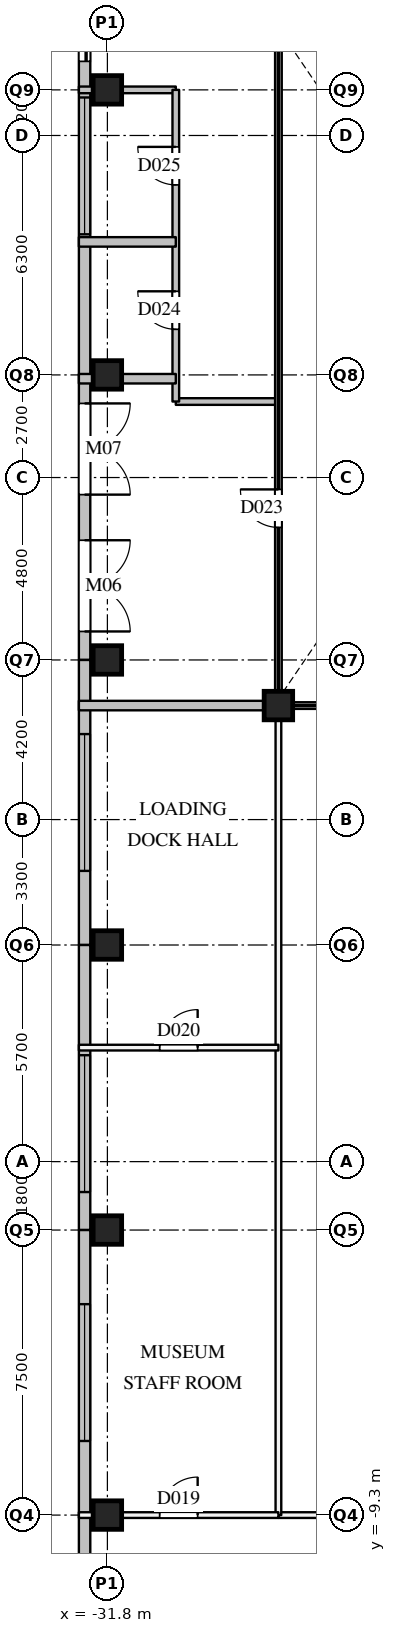
"""IFC4 building model, lengths in metres.
Left out: names, types, materials, properties, quantities, classifications, styles, units other than length and angle.
Written with IfcOpenShell. Run it as: python <this file> out.ifc"""

import sys

from ifc_helpers import new_model, si_unit, direction, frame, frame_2d, origin, origin_2d, place, context, subcontext, project, spatial, rectangle, extrude, element, fill, save


model = new_model("IFC4")
c1 = context("Model", 3, precision=1e-05, world=origin(), true_north=direction((0.0, 1.0)))
c2 = subcontext(c1, "Body", "Model", "MODEL_VIEW")
j1 = project(units=[si_unit("LENGTHUNIT", "METRE"), si_unit("PLANEANGLEUNIT", "RADIAN")], contexts=[c1])
p1 = place(None, origin())
s1 = spatial("IfcSite", under=j1, at=p1, CompositionType="ELEMENT")
p2 = place(p1, origin())
s2 = spatial("IfcBuilding", under=s1, at=p2, CompositionType="ELEMENT")
p3 = place(p2, origin())
s3 = spatial("IfcBuildingStorey", under=s2, at=p3, CompositionType="ELEMENT", Elevation=0.0)
for number, where, z_axis, x_axis in (
    (1, (-31.8, -9.3, 0.0), (0.0, 0.0, 1.0), (1.0, 0.0, 0.0)),
    (2, (-31.8, -1.8, 0.0), (0.0, 0.0, 1.0), (1.0, 0.0, 0.0)),
    (3, (-31.8, 5.7, 0.0), (0.0, 0.0, 1.0), (1.0, 0.0, 0.0)),
    (4, (-31.8, 13.2, 0.0), (0.0, 0.0, 1.0), (1.0, 0.0, 0.0)),
    (5, (-31.8, 20.7, 0.0), (0.0, 0.0, 1.0), (1.0, 0.0, 0.0)),
    (6, (-31.8, 28.2, 0.0), (0.0, 0.0, 1.0), (1.0, 0.0, 0.0)),
    (7, (-27.3, 12.0, 0.0), (0.0, 0.0, 1.0), (1.0, 0.0, 0.0)),
):
    element("IfcColumn", number, at=place(p3, frame(where, z_axis=z_axis, x_axis=x_axis)), inside=s3, PredefinedType="COLUMN", context=c2, shape_type="SweptSolid", body=[
        extrude(rectangle(XDim=0.75, YDim=0.75, at=origin_2d()), origin(), (0.0, 0.0, 1.0), 8.0),
    ])
p4 = place(p3, frame((-32.4, 35.7, 0.0), z_axis=(0.0, 0.0, 1.0), x_axis=(0.0, -1.0, 0.0)))
e8 = element("IfcWall", 8, at=p4, inside=s3, PredefinedType="SOLIDWALL", context=c2, shape_type="SweptSolid", body=[
    extrude(rectangle(XDim=7.5, YDim=0.3, at=frame_2d((3.75, 0.0))), origin(), (0.0, 0.0, 1.0), 7.59),
])
p5 = place(p4, frame((4.35, 0.0, 0.0)))
e9 = element("IfcOpeningElement", 9, at=p5, cuts=e8, PredefinedType="OPENING", context=c2, shape_type="SweptSolid", body=[
    extrude(rectangle(XDim=2.4, YDim=2.4, at=frame_2d((1.2, 1.2))), frame((0.0, 0.16, 0.0), z_axis=(0.0, -1.0, 0.0), x_axis=(1.0, 0.0, 0.0)), (0.0, 0.0, 1.0), 0.32),
])
p6 = place(p4, frame((0.75, 0.0, 0.0)))
e10 = element("IfcOpeningElement", 10, at=p6, cuts=e8, PredefinedType="OPENING", context=c2, shape_type="SweptSolid", body=[
    extrude(rectangle(XDim=2.4, YDim=2.4, at=frame_2d((1.2, 1.2))), frame((0.0, 0.16, 0.0), z_axis=(0.0, -1.0, 0.0), x_axis=(1.0, 0.0, 0.0)), (0.0, 0.0, 1.0), 0.32),
])
p7 = place(p3, frame((-32.4, 28.2, 0.0), z_axis=(0.0, 0.0, 1.0), x_axis=(0.0, -1.0, 0.0)))
e11 = element("IfcWall", 11, at=p7, inside=s3, PredefinedType="SOLIDWALL", context=c2, shape_type="SweptSolid", body=[
    extrude(rectangle(XDim=7.5, YDim=0.3, at=frame_2d((3.75, 0.0))), origin(), (0.0, 0.0, 1.0), 7.59),
])
p8 = place(p7, frame((0.2, 0.0, 0.9)))
e12 = element("IfcOpeningElement", 12, at=p8, cuts=e11, PredefinedType="OPENING", context=c2, shape_type="SweptSolid", body=[
    extrude(rectangle(XDim=3.6, YDim=3.0, at=frame_2d((1.8, 1.5))), frame((0.0, 0.16, 0.0), z_axis=(0.0, -1.0, 0.0), x_axis=(1.0, 0.0, 0.0)), (0.0, 0.0, 1.0), 0.32),
])
p9 = place(p3, frame((-32.4, 20.7, 0.0), z_axis=(0.0, 0.0, 1.0), x_axis=(0.0, -1.0, 0.0)))
e13 = element("IfcWall", 13, at=p9, inside=s3, PredefinedType="SOLIDWALL", context=c2, shape_type="SweptSolid", body=[
    extrude(rectangle(XDim=7.5, YDim=0.3, at=frame_2d((3.75, 0.0))), origin(), (0.0, 0.0, 1.0), 7.59),
])
p10 = place(p9, frame((4.35, 0.0, 0.0)))
e14 = element("IfcOpeningElement", 14, at=p10, cuts=e13, PredefinedType="OPENING", context=c2, shape_type="SweptSolid", body=[
    extrude(rectangle(XDim=2.4, YDim=2.7, at=frame_2d((1.2, 1.35))), frame((0.0, 0.16, 0.0), z_axis=(0.0, -1.0, 0.0), x_axis=(1.0, 0.0, 0.0)), (0.0, 0.0, 1.0), 0.32),
])
p11 = place(p9, frame((0.75, 0.0, 0.0)))
e15 = element("IfcOpeningElement", 15, at=p11, cuts=e13, PredefinedType="OPENING", context=c2, shape_type="SweptSolid", body=[
    extrude(rectangle(XDim=2.4, YDim=2.7, at=frame_2d((1.2, 1.35))), frame((0.0, 0.16, 0.0), z_axis=(0.0, -1.0, 0.0), x_axis=(1.0, 0.0, 0.0)), (0.0, 0.0, 1.0), 0.32),
])
p12 = place(p3, frame((-32.4, 13.2, 0.0), z_axis=(0.0, 0.0, 1.0), x_axis=(0.0, -1.0, 0.0)))
e16 = element("IfcWall", 16, at=p12, inside=s3, PredefinedType="SOLIDWALL", context=c2, shape_type="SweptSolid", body=[
    extrude(rectangle(XDim=7.5, YDim=0.3, at=frame_2d((3.75, 0.0))), origin(), (0.0, 0.0, 1.0), 7.59),
])
p13 = place(p12, frame((1.95, 0.0, 0.9)))
e17 = element("IfcOpeningElement", 17, at=p13, cuts=e16, PredefinedType="OPENING", context=c2, shape_type="SweptSolid", body=[
    extrude(rectangle(XDim=3.6, YDim=3.0, at=frame_2d((1.8, 1.5))), frame((0.0, 0.16, 0.0), z_axis=(0.0, -1.0, 0.0), x_axis=(1.0, 0.0, 0.0)), (0.0, 0.0, 1.0), 0.32),
])
p14 = place(p3, frame((-32.4, 5.7, 0.0), z_axis=(0.0, 0.0, 1.0), x_axis=(0.0, -1.0, 0.0)))
e18 = element("IfcWall", 18, at=p14, inside=s3, PredefinedType="SOLIDWALL", context=c2, shape_type="SweptSolid", body=[
    extrude(rectangle(XDim=7.5, YDim=0.3, at=frame_2d((3.75, 0.0))), origin(), (0.0, 0.0, 1.0), 7.59),
])
p15 = place(p14, frame((2.9, 0.0, 0.9)))
e19 = element("IfcOpeningElement", 19, at=p15, cuts=e18, PredefinedType="OPENING", context=c2, shape_type="SweptSolid", body=[
    extrude(rectangle(XDim=3.6, YDim=3.0, at=frame_2d((1.8, 1.5))), frame((0.0, 0.16, 0.0), z_axis=(0.0, -1.0, 0.0), x_axis=(1.0, 0.0, 0.0)), (0.0, 0.0, 1.0), 0.32),
])
p16 = place(p3, frame((-32.4, -1.8, 0.0), z_axis=(0.0, 0.0, 1.0), x_axis=(0.0, -1.0, 0.0)))
e20 = element("IfcWall", 20, at=p16, inside=s3, PredefinedType="SOLIDWALL", context=c2, shape_type="SweptSolid", body=[
    extrude(rectangle(XDim=7.5, YDim=0.3, at=frame_2d((3.75, 0.0))), origin(), (0.0, 0.0, 1.0), 7.59),
])
p17 = place(p16, frame((1.95, 0.0, 0.9)))
e21 = element("IfcOpeningElement", 21, at=p17, cuts=e20, PredefinedType="OPENING", context=c2, shape_type="SweptSolid", body=[
    extrude(rectangle(XDim=3.6, YDim=3.0, at=frame_2d((1.8, 1.5))), frame((0.0, 0.16, 0.0), z_axis=(0.0, -1.0, 0.0), x_axis=(1.0, 0.0, 0.0)), (0.0, 0.0, 1.0), 0.32),
])
p18 = place(p3, frame((-32.4, -9.3, 0.0), z_axis=(0.0, 0.0, 1.0), x_axis=(0.0, -1.0, 0.0)))
e22 = element("IfcWall", 22, at=p18, inside=s3, PredefinedType="SOLIDWALL", context=c2, shape_type="SweptSolid", body=[
    extrude(rectangle(XDim=7.5, YDim=0.3, at=frame_2d((3.75, 0.0))), origin(), (0.0, 0.0, 1.0), 7.59),
])
p19 = place(p18, frame((1.95, 0.0, 0.9)))
e23 = element("IfcOpeningElement", 23, at=p19, cuts=e22, PredefinedType="OPENING", context=c2, shape_type="SweptSolid", body=[
    extrude(rectangle(XDim=3.6, YDim=3.0, at=frame_2d((1.8, 1.5))), frame((0.0, 0.16, 0.0), z_axis=(0.0, -1.0, 0.0), x_axis=(1.0, 0.0, 0.0)), (0.0, 0.0, 1.0), 0.32),
])
p20 = place(p3, frame((-27.3, 12.0, 0.0), z_axis=(0.0, 0.0, 1.0), x_axis=(1.0, 0.0, 0.0)))
e24 = element("IfcWall", 24, at=p20, inside=s3, PredefinedType="PARTITIONING", context=c2, shape_type="SweptSolid", body=[
    extrude(rectangle(XDim=12.0, YDim=0.175, at=frame_2d((6.0, 0.0))), origin(), (0.0, 0.0, 1.0), 7.59),
])
p21 = place(p20, frame((5.0, 0.0, 0.0)))
e25 = element("IfcOpeningElement", 25, at=p21, cuts=e24, PredefinedType="OPENING", context=c2, shape_type="SweptSolid", body=[
    extrude(rectangle(XDim=1.0, YDim=2.1, at=frame_2d((0.5, 1.05))), frame((0.0, 0.097, 0.0), z_axis=(0.0, -1.0, 0.0), x_axis=(1.0, 0.0, 0.0)), (0.0, 0.0, 1.0), 0.195),
])
p22 = place(p3, frame((-30.0, 20.0, 0.0), z_axis=(0.0, 0.0, 1.0), x_axis=(1.0, 0.0, 0.0)))
e26 = element("IfcWall", 26, at=p22, inside=s3, PredefinedType="PARTITIONING", context=c2, shape_type="SweptSolid", body=[
    extrude(rectangle(XDim=2.7, YDim=0.175, at=frame_2d((1.35, 0.0))), origin(), (0.0, 0.0, 1.0), 7.59),
])
p23 = place(p3, frame((-32.55, 28.2, 0.0), z_axis=(0.0, 0.0, 1.0), x_axis=(1.0, 0.0, 0.0)))
e27 = element("IfcWall", 27, at=p23, inside=s3, PredefinedType="PARTITIONING", context=c2, shape_type="SweptSolid", body=[
    extrude(rectangle(XDim=2.55, YDim=0.175, at=frame_2d((1.275, 0.0))), origin(), (0.0, 0.0, 1.0), 7.59),
])
p24 = place(p3, frame((-30.0, 20.0, 0.0), z_axis=(0.0, 0.0, 1.0), x_axis=(0.0, 1.0, 0.0)))
e28 = element("IfcWall", 28, at=p24, inside=s3, PredefinedType="PARTITIONING", context=c2, shape_type="SweptSolid", body=[
    extrude(rectangle(XDim=8.2, YDim=0.175, at=frame_2d((4.1, 0.0))), origin(), (0.0, 0.0, 1.0), 7.59),
])
p25 = place(p24, frame((1.9, 0.0, 0.0)))
e29 = element("IfcOpeningElement", 29, at=p25, cuts=e28, PredefinedType="OPENING", context=c2, shape_type="SweptSolid", body=[
    extrude(rectangle(XDim=1.0, YDim=2.1, at=frame_2d((0.5, 1.05))), frame((0.0, 0.097, 0.0), z_axis=(0.0, -1.0, 0.0), x_axis=(1.0, 0.0, 0.0)), (0.0, 0.0, 1.0), 0.195),
])
p26 = place(p24, frame((5.7, 0.0, 0.0)))
e30 = element("IfcOpeningElement", 30, at=p26, cuts=e28, PredefinedType="OPENING", context=c2, shape_type="SweptSolid", body=[
    extrude(rectangle(XDim=1.0, YDim=2.1, at=frame_2d((0.5, 1.05))), frame((0.0, 0.097, 0.0), z_axis=(0.0, -1.0, 0.0), x_axis=(1.0, 0.0, 0.0)), (0.0, 0.0, 1.0), 0.195),
])
p27 = place(p3, frame((-27.3, 12.0, 0.0), z_axis=(0.0, 0.0, 1.0), x_axis=(0.0, 1.0, 0.0)))
e31 = element("IfcWall", 31, at=p27, inside=s3, PredefinedType="PARTITIONING", context=c2, shape_type="SweptSolid", body=[
    extrude(rectangle(XDim=35.35, YDim=0.175, at=frame_2d((17.675, 0.0))), origin(), (0.0, 0.0, 1.0), 6.79),
])
p28 = place(p27, frame((18.4, 0.0, 0.0)))
e32 = element("IfcOpeningElement", 32, at=p28, cuts=e31, PredefinedType="OPENING", context=c2, shape_type="SweptSolid", body=[
    extrude(rectangle(XDim=1.8, YDim=2.1, at=frame_2d((0.9, 1.05))), frame((0.0, 0.097, 0.0), z_axis=(0.0, -1.0, 0.0), x_axis=(1.0, 0.0, 0.0)), (0.0, 0.0, 1.0), 0.195),
])
p29 = place(p27, frame((23.7, 0.0, 0.0)))
e33 = element("IfcOpeningElement", 33, at=p29, cuts=e31, PredefinedType="OPENING", context=c2, shape_type="SweptSolid", body=[
    extrude(rectangle(XDim=1.8, YDim=2.1, at=frame_2d((0.9, 1.05))), frame((0.0, 0.097, 0.0), z_axis=(0.0, -1.0, 0.0), x_axis=(1.0, 0.0, 0.0)), (0.0, 0.0, 1.0), 0.195),
])
p30 = place(p27, frame((4.688, 0.0, 0.0)))
e34 = element("IfcOpeningElement", 34, at=p30, cuts=e31, PredefinedType="OPENING", context=c2, shape_type="SweptSolid", body=[
    extrude(rectangle(XDim=1.0, YDim=2.1, at=frame_2d((0.5, 1.05))), frame((0.0, 0.097, 0.0), z_axis=(0.0, -1.0, 0.0), x_axis=(1.0, 0.0, 0.0)), (0.0, 0.0, 1.0), 0.195),
])
p31 = place(p3, frame((-27.3, -9.3, 0.0), z_axis=(0.0, 0.0, 1.0), x_axis=(1.0, 0.0, 0.0)))
e35 = element("IfcWall", 35, at=p31, inside=s3, PredefinedType="PARTITIONING", context=c2, shape_type="SweptSolid", body=[
    extrude(rectangle(XDim=3.0, YDim=0.15, at=frame_2d((1.5, 0.0))), origin(), (0.0, 0.0, 1.0), 6.79),
])
p32 = place(p3, frame((-27.3, -9.3, 0.0), z_axis=(0.0, 0.0, 1.0), x_axis=(0.0, 1.0, 0.0)))
e36 = element("IfcWall", 36, at=p32, inside=s3, PredefinedType="PARTITIONING", context=c2, shape_type="SweptSolid", body=[
    extrude(rectangle(XDim=21.3, YDim=0.15, at=frame_2d((10.65, 0.0))), origin(), (0.0, 0.0, 1.0), 6.79),
])
p33 = place(p3, frame((-32.55, -9.3, 0.0), z_axis=(0.0, 0.0, 1.0), x_axis=(1.0, 0.0, 0.0)))
e37 = element("IfcWall", 37, at=p33, inside=s3, PredefinedType="PARTITIONING", context=c2, shape_type="SweptSolid", body=[
    extrude(rectangle(XDim=5.25, YDim=0.15, at=frame_2d((2.625, 0.0))), origin(), (0.0, 0.0, 1.0), 6.79),
])
p34 = place(p33, frame((2.125, 0.0, 0.0)))
e38 = element("IfcOpeningElement", 38, at=p34, cuts=e37, PredefinedType="OPENING", context=c2, shape_type="SweptSolid", body=[
    extrude(rectangle(XDim=1.0, YDim=2.1, at=frame_2d((0.5, 1.05))), frame((0.0, 0.085, 0.0), z_axis=(0.0, -1.0, 0.0), x_axis=(1.0, 0.0, 0.0)), (0.0, 0.0, 1.0), 0.17),
])
p35 = place(p3, frame((-32.55, 3.0, 0.0), z_axis=(0.0, 0.0, 1.0), x_axis=(1.0, 0.0, 0.0)))
e39 = element("IfcWall", 39, at=p35, inside=s3, PredefinedType="PARTITIONING", context=c2, shape_type="SweptSolid", body=[
    extrude(rectangle(XDim=5.25, YDim=0.15, at=frame_2d((2.625, 0.0))), origin(), (0.0, 0.0, 1.0), 6.79),
])
p36 = place(p35, frame((2.125, 0.0, 0.0)))
e40 = element("IfcOpeningElement", 40, at=p36, cuts=e39, PredefinedType="OPENING", context=c2, shape_type="SweptSolid", body=[
    extrude(rectangle(XDim=1.0, YDim=2.1, at=frame_2d((0.5, 1.05))), frame((0.0, 0.085, 0.0), z_axis=(0.0, -1.0, 0.0), x_axis=(1.0, 0.0, 0.0)), (0.0, 0.0, 1.0), 0.17),
])
p37 = place(p3, frame((-32.55, 12.0, 0.0), z_axis=(0.0, 0.0, 1.0), x_axis=(1.0, 0.0, 0.0)))
e41 = element("IfcWall", 41, at=p37, inside=s3, PredefinedType="PARTITIONING", context=c2, shape_type="SweptSolid", body=[
    extrude(rectangle(XDim=5.25, YDim=0.25, at=frame_2d((2.625, 0.0))), origin(), (0.0, 0.0, 1.0), 6.79),
])
p38 = place(p3, frame((-32.55, 20.6, 0.0), z_axis=(0.0, 0.0, 1.0), x_axis=(1.0, 0.0, 0.0)))
e42 = element("IfcWall", 42, at=p38, inside=s3, PredefinedType="PARTITIONING", context=c2, shape_type="SweptSolid", body=[
    extrude(rectangle(XDim=2.55, YDim=0.25, at=frame_2d((1.275, 0.0))), origin(), (0.0, 0.0, 1.0), 7.59),
])
p39 = place(p3, frame((-32.55, 24.2, 0.0), z_axis=(0.0, 0.0, 1.0), x_axis=(1.0, 0.0, 0.0)))
e43 = element("IfcWall", 43, at=p39, inside=s3, PredefinedType="PARTITIONING", context=c2, shape_type="SweptSolid", body=[
    extrude(rectangle(XDim=2.55, YDim=0.25, at=frame_2d((1.275, 0.0))), origin(), (0.0, 0.0, 1.0), 6.79),
])
p40 = place(p5, origin())
e44 = element("IfcDoor", 44, at=p40, inside=s3, OperationType="SLIDING_TO_LEFT", PredefinedType="DOOR", context=c2, shape_type="SweptSolid", body=[
    extrude(rectangle(XDim=2.4, YDim=2.4, at=frame_2d((1.2, 1.2))), frame((0.0, 0.025, 0.0), z_axis=(0.0, -1.0, 0.0), x_axis=(1.0, 0.0, 0.0)), (0.0, 0.0, 1.0), 0.05),
])
fill(e9, e44)
p41 = place(p8, origin())
e45 = element("IfcWindow", 45, at=p41, inside=s3, PartitioningType="SINGLE_PANEL", PredefinedType="WINDOW", context=c2, shape_type="SweptSolid", body=[
    extrude(rectangle(XDim=3.6, YDim=3.0, at=frame_2d((1.8, 1.5))), frame((0.0, 0.03, 0.0), z_axis=(0.0, -1.0, 0.0), x_axis=(1.0, 0.0, 0.0)), (0.0, 0.0, 1.0), 0.06),
])
fill(e12, e45)
p42 = place(p10, origin())
e46 = element("IfcDoor", 46, at=p42, inside=s3, OperationType="DOUBLE_DOOR_SINGLE_SWING", PredefinedType="DOOR", context=c2, shape_type="SweptSolid", body=[
    extrude(rectangle(XDim=2.4, YDim=2.7, at=frame_2d((1.2, 1.35))), frame((0.0, 0.025, 0.0), z_axis=(0.0, -1.0, 0.0), x_axis=(1.0, 0.0, 0.0)), (0.0, 0.0, 1.0), 0.05),
])
fill(e14, e46)
p43 = place(p11, origin())
e47 = element("IfcDoor", 47, at=p43, inside=s3, OperationType="DOUBLE_DOOR_SINGLE_SWING", PredefinedType="DOOR", context=c2, shape_type="SweptSolid", body=[
    extrude(rectangle(XDim=2.4, YDim=2.7, at=frame_2d((1.2, 1.35))), frame((0.0, 0.025, 0.0), z_axis=(0.0, -1.0, 0.0), x_axis=(1.0, 0.0, 0.0)), (0.0, 0.0, 1.0), 0.05),
])
fill(e15, e47)
p44 = place(p13, origin())
e48 = element("IfcWindow", 48, at=p44, inside=s3, PartitioningType="SINGLE_PANEL", PredefinedType="WINDOW", context=c2, shape_type="SweptSolid", body=[
    extrude(rectangle(XDim=3.6, YDim=3.0, at=frame_2d((1.8, 1.5))), frame((0.0, 0.03, 0.0), z_axis=(0.0, -1.0, 0.0), x_axis=(1.0, 0.0, 0.0)), (0.0, 0.0, 1.0), 0.06),
])
fill(e17, e48)
p45 = place(p15, origin())
e49 = element("IfcWindow", 49, at=p45, inside=s3, PartitioningType="SINGLE_PANEL", PredefinedType="WINDOW", context=c2, shape_type="SweptSolid", body=[
    extrude(rectangle(XDim=3.6, YDim=3.0, at=frame_2d((1.8, 1.5))), frame((0.0, 0.03, 0.0), z_axis=(0.0, -1.0, 0.0), x_axis=(1.0, 0.0, 0.0)), (0.0, 0.0, 1.0), 0.06),
])
fill(e19, e49)
p46 = place(p17, origin())
e50 = element("IfcWindow", 50, at=p46, inside=s3, PartitioningType="SINGLE_PANEL", PredefinedType="WINDOW", context=c2, shape_type="SweptSolid", body=[
    extrude(rectangle(XDim=3.6, YDim=3.0, at=frame_2d((1.8, 1.5))), frame((0.0, 0.03, 0.0), z_axis=(0.0, -1.0, 0.0), x_axis=(1.0, 0.0, 0.0)), (0.0, 0.0, 1.0), 0.06),
])
fill(e21, e50)
p47 = place(p34, origin())
e51 = element("IfcDoor", 51, at=p47, inside=s3, OperationType="SINGLE_SWING_RIGHT", PredefinedType="DOOR", context=c2, shape_type="SweptSolid", body=[
    extrude(rectangle(XDim=1.0, YDim=2.1, at=frame_2d((0.5, 1.05))), frame((0.0, 0.025, 0.0), z_axis=(0.0, -1.0, 0.0), x_axis=(1.0, 0.0, 0.0)), (0.0, 0.0, 1.0), 0.05),
])
fill(e38, e51)
p48 = place(p36, origin())
e52 = element("IfcDoor", 52, at=p48, inside=s3, OperationType="SINGLE_SWING_RIGHT", PredefinedType="DOOR", context=c2, shape_type="SweptSolid", body=[
    extrude(rectangle(XDim=1.0, YDim=2.1, at=frame_2d((0.5, 1.05))), frame((0.0, 0.025, 0.0), z_axis=(0.0, -1.0, 0.0), x_axis=(1.0, 0.0, 0.0)), (0.0, 0.0, 1.0), 0.05),
])
fill(e40, e52)
p49 = place(p30, origin())
e53 = element("IfcDoor", 53, at=p49, inside=s3, OperationType="SINGLE_SWING_RIGHT", PredefinedType="DOOR", context=c2, shape_type="SweptSolid", body=[
    extrude(rectangle(XDim=1.0, YDim=2.1, at=frame_2d((0.5, 1.05))), frame((0.0, 0.025, 0.0), z_axis=(0.0, -1.0, 0.0), x_axis=(1.0, 0.0, 0.0)), (0.0, 0.0, 1.0), 0.05),
])
fill(e34, e53)
p50 = place(p25, origin())
e54 = element("IfcDoor", 54, at=p50, inside=s3, OperationType="SINGLE_SWING_RIGHT", PredefinedType="DOOR", context=c2, shape_type="SweptSolid", body=[
    extrude(rectangle(XDim=1.0, YDim=2.1, at=frame_2d((0.5, 1.05))), frame((0.0, 0.025, 0.0), z_axis=(0.0, -1.0, 0.0), x_axis=(1.0, 0.0, 0.0)), (0.0, 0.0, 1.0), 0.05),
])
fill(e29, e54)
p51 = place(p26, origin())
e55 = element("IfcDoor", 55, at=p51, inside=s3, OperationType="SINGLE_SWING_RIGHT", PredefinedType="DOOR", context=c2, shape_type="SweptSolid", body=[
    extrude(rectangle(XDim=1.0, YDim=2.1, at=frame_2d((0.5, 1.05))), frame((0.0, 0.025, 0.0), z_axis=(0.0, -1.0, 0.0), x_axis=(1.0, 0.0, 0.0)), (0.0, 0.0, 1.0), 0.05),
])
fill(e30, e55)
save(model, sys.argv[1])
